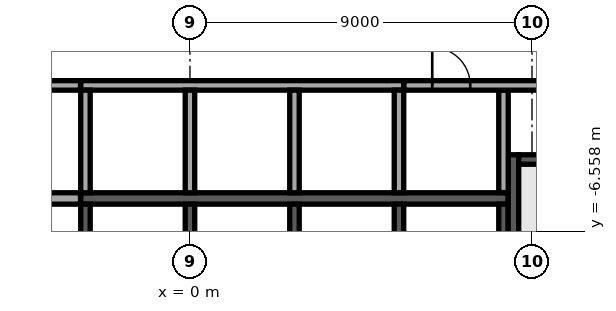
"""IFC4 building model, lengths in metres.
Left out: names, types, materials, properties, quantities, classifications, styles, units other than length and angle.
Written with IfcOpenShell. Run it as: python <this file> out.ifc"""

import sys

from ifc_helpers import new_model, si_unit, direction, frame, frame_2d, origin, place, context, subcontext, project, spatial, rectangle, extrude, element, fill, save


model = new_model("IFC4")
c1 = context("Model", 3, precision=1e-05, world=origin(), true_north=direction((0.0, 1.0)))
c2 = subcontext(c1, "Body", "Model", "MODEL_VIEW")
j1 = project(units=[si_unit("LENGTHUNIT", "METRE"), si_unit("PLANEANGLEUNIT", "RADIAN")], contexts=[c1])
p1 = place(None, origin())
s1 = spatial("IfcSite", under=j1, at=p1, CompositionType="ELEMENT")
p2 = place(p1, origin())
s2 = spatial("IfcBuilding", under=s1, at=p2, CompositionType="ELEMENT")
p3 = place(p2, frame((0.0, 0.0, 217.3)))
s3 = spatial("IfcBuildingStorey", under=s2, at=p3, CompositionType="ELEMENT", Elevation=217.3)
p4 = place(p3, frame((-2.875, -5.7, 0.0), z_axis=(0.0, 0.0, 1.0), x_axis=(1.0, 0.0, 0.0)))
e1 = element("IfcWall", 1, at=p4, inside=s3, PredefinedType="SOLIDWALL", context=c2, shape_type="SweptSolid", body=[
    extrude(rectangle(XDim=11.25, YDim=0.3, at=frame_2d((5.625, 0.0))), origin(), (0.0, 0.0, 1.0), 3.62),
])
p5 = place(p3, frame((-2.875, -2.725, 0.0), z_axis=(0.0, 0.0, 1.0), x_axis=(1.0, 0.0, 0.0)))
e2 = element("IfcWall", 2, at=p5, inside=s3, PredefinedType="SOLIDWALL", context=c2, shape_type="SweptSolid", body=[
    extrude(rectangle(XDim=8.5, YDim=0.25, at=frame_2d((4.25, 0.0))), origin(), (0.0, 0.0, 1.0), 3.62),
])
for number, where, z_axis, x_axis in (
    (3, (-2.75, -5.55, 0.0), (0.0, 0.0, 1.0), (0.0, 1.0, 0.0)),
    (4, (0.0, -5.55, 0.0), (0.0, 0.0, 1.0), (0.0, 1.0, 0.0)),
    (5, (2.75, -5.55, 0.0), (0.0, 0.0, 1.0), (0.0, 1.0, 0.0)),
    (6, (5.5, -5.55, 0.0), (0.0, 0.0, 1.0), (0.0, 1.0, 0.0)),
    (7, (-2.75, -8.55, 0.0), (0.0, 0.0, 1.0), (0.0, 1.0, 0.0)),
    (8, (0.0, -8.55, 0.0), (0.0, 0.0, 1.0), (0.0, 1.0, 0.0)),
    (9, (2.75, -8.55, 0.0), (0.0, 0.0, 1.0), (0.0, 1.0, 0.0)),
    (10, (5.5, -8.55, 0.0), (0.0, 0.0, 1.0), (0.0, 1.0, 0.0)),
    (11, (8.25, -8.55, 0.0), (0.0, 0.0, 1.0), (0.0, 1.0, 0.0)),
):
    element("IfcWall", number, at=place(p3, frame(where, z_axis=z_axis, x_axis=x_axis)), inside=s3, PredefinedType="SOLIDWALL", context=c2, shape_type="SweptSolid", body=[
        extrude(rectangle(XDim=2.7, YDim=0.25, at=frame_2d((1.35, 0.0))), origin(), (0.0, 0.0, 1.0), 3.62),
    ])
p6 = place(p3, frame((8.512, -4.55, 0.0), z_axis=(0.0, 0.0, 1.0), x_axis=(0.0, -1.0, 0.0)))
e12 = element("IfcWall", 12, at=p6, inside=s3, PredefinedType="SOLIDWALL", context=c2, shape_type="SweptSolid", body=[
    extrude(rectangle(XDim=7.25, YDim=0.275, at=frame_2d((3.625, 0.0))), origin(), (0.0, 0.0, 1.0), 3.62),
])
p7 = place(p6, frame((6.0, 0.0, 0.0)))
e13 = element("IfcOpeningElement", 13, at=p7, cuts=e12, PredefinedType="OPENING", context=c2, shape_type="SweptSolid", body=[
    extrude(rectangle(XDim=1.0, YDim=2.1, at=frame_2d((0.5, 1.05))), frame((0.0, 0.147, 0.0), z_axis=(0.0, -1.0, 0.0), x_axis=(1.0, 0.0, 0.0)), (0.0, 0.0, 1.0), 0.295),
])
p8 = place(p3, frame((8.65, -4.675, 0.0), z_axis=(0.0, 0.0, 1.0), x_axis=(1.0, 0.0, 0.0)))
e14 = element("IfcWall", 14, at=p8, inside=s3, PredefinedType="SOLIDWALL", context=c2, shape_type="SweptSolid", body=[
    extrude(rectangle(XDim=3.15, YDim=0.25, at=frame_2d((1.575, 0.0))), origin(), (0.0, 0.0, 1.0), 3.62),
])
p9 = place(p3, frame((-8.35, -5.7, 0.0), z_axis=(0.0, 0.0, 1.0), x_axis=(1.0, 0.0, 0.0)))
e15 = element("IfcWall", 15, at=p9, inside=s3, PredefinedType="PARTITIONING", context=c2, shape_type="SweptSolid", body=[
    extrude(rectangle(XDim=5.47, YDim=0.3, at=frame_2d((2.735, 0.0))), origin(), (0.0, 0.0, 1.0), 3.62),
])
p10 = place(p3, frame((8.25, -5.545, 0.0), z_axis=(0.0, 0.0, 1.0), x_axis=(0.0, 1.0, 0.0)))
e16 = element("IfcWall", 16, at=p10, inside=s3, PredefinedType="PARTITIONING", context=c2, shape_type="SweptSolid", body=[
    extrude(rectangle(XDim=2.69, YDim=0.25, at=frame_2d((1.345, 0.0))), origin(), (0.0, 0.0, 1.0), 3.62),
])
p11 = place(p3, frame((-11.795, -2.725, 0.0), z_axis=(0.0, 0.0, 1.0), x_axis=(1.0, 0.0, 0.0)))
e17 = element("IfcWall", 17, at=p11, inside=s3, PredefinedType="PARTITIONING", context=c2, shape_type="SweptSolid", body=[
    extrude(rectangle(XDim=8.915, YDim=0.25, at=frame_2d((4.458, 0.0))), origin(), (0.0, 0.0, 1.0), 3.62),
])
p12 = place(p11, frame((1.295, 0.0, 0.0)))
e18 = element("IfcOpeningElement", 18, at=p12, cuts=e17, PredefinedType="OPENING", context=c2, shape_type="SweptSolid", body=[
    extrude(rectangle(XDim=1.0, YDim=2.1, at=frame_2d((0.5, 1.05))), frame((0.0, 0.135, 0.0), z_axis=(0.0, -1.0, 0.0), x_axis=(1.0, 0.0, 0.0)), (0.0, 0.0, 1.0), 0.27),
])
p13 = place(p11, frame((4.42, 0.0, 0.0)))
e19 = element("IfcOpeningElement", 19, at=p13, cuts=e17, PredefinedType="OPENING", context=c2, shape_type="SweptSolid", body=[
    extrude(rectangle(XDim=1.0, YDim=2.1, at=frame_2d((0.5, 1.05))), frame((0.0, 0.135, 0.0), z_axis=(0.0, -1.0, 0.0), x_axis=(1.0, 0.0, 0.0)), (0.0, 0.0, 1.0), 0.27),
])
p14 = place(p3, frame((5.63, -2.725, 0.0), z_axis=(0.0, 0.0, 1.0), x_axis=(1.0, 0.0, 0.0)))
e20 = element("IfcWall", 20, at=p14, inside=s3, PredefinedType="PARTITIONING", context=c2, shape_type="SweptSolid", body=[
    extrude(rectangle(XDim=6.165, YDim=0.25, at=frame_2d((3.083, 0.0))), origin(), (0.0, 0.0, 1.0), 3.62),
])
p15 = place(p14, frame((0.745, 0.0, 0.0)))
e21 = element("IfcOpeningElement", 21, at=p15, cuts=e20, PredefinedType="OPENING", context=c2, shape_type="SweptSolid", body=[
    extrude(rectangle(XDim=1.0, YDim=2.1, at=frame_2d((0.5, 1.05))), frame((0.0, 0.135, 0.0), z_axis=(0.0, -1.0, 0.0), x_axis=(1.0, 0.0, 0.0)), (0.0, 0.0, 1.0), 0.27),
])
p16 = place(p14, frame((3.92, 0.0, 0.0)))
e22 = element("IfcOpeningElement", 22, at=p16, cuts=e20, PredefinedType="OPENING", context=c2, shape_type="SweptSolid", body=[
    extrude(rectangle(XDim=0.9, YDim=2.1, at=frame_2d((0.45, 1.05))), frame((0.0, 0.135, 0.0), z_axis=(0.0, -1.0, 0.0), x_axis=(1.0, 0.0, 0.0)), (0.0, 0.0, 1.0), 0.27),
])
p17 = place(p3, frame((-1.962, 34.735, 0.0), z_axis=(0.0, 0.0, 1.0), x_axis=(-0.669133181838, -0.743142506497, 0.0)))
e23 = element("IfcWall", 23, at=p17, inside=s3, PredefinedType="STANDARD", context=c2, shape_type="SweptSolid", body=[
    extrude(rectangle(XDim=49.0, YDim=0.6, at=frame_2d((24.5, 0.0))), origin(), (0.0, 0.0, 1.0), 3.62),
])
p18 = place(p17, frame((1.227, 0.0, 0.9)))
e24 = element("IfcOpeningElement", 24, at=p18, cuts=e23, PredefinedType="OPENING", context=c2, shape_type="SweptSolid", body=[
    extrude(rectangle(XDim=2.0, YDim=2.1, at=frame_2d((1.0, 1.05))), frame((0.0, 0.31, 0.0), z_axis=(0.0, -1.0, 0.0), x_axis=(1.0, 0.0, 0.0)), (0.0, 0.0, 1.0), 0.62),
])
p19 = place(p17, frame((5.682, 0.0, 0.9)))
e25 = element("IfcOpeningElement", 25, at=p19, cuts=e23, PredefinedType="OPENING", context=c2, shape_type="SweptSolid", body=[
    extrude(rectangle(XDim=2.0, YDim=2.1, at=frame_2d((1.0, 1.05))), frame((0.0, 0.31, 0.0), z_axis=(0.0, -1.0, 0.0), x_axis=(1.0, 0.0, 0.0)), (0.0, 0.0, 1.0), 0.62),
])
p20 = place(p17, frame((10.136, 0.0, 0.9)))
e26 = element("IfcOpeningElement", 26, at=p20, cuts=e23, PredefinedType="OPENING", context=c2, shape_type="SweptSolid", body=[
    extrude(rectangle(XDim=2.0, YDim=2.1, at=frame_2d((1.0, 1.05))), frame((0.0, 0.31, 0.0), z_axis=(0.0, -1.0, 0.0), x_axis=(1.0, 0.0, 0.0)), (0.0, 0.0, 1.0), 0.62),
])
p21 = place(p17, frame((14.591, 0.0, 0.9)))
e27 = element("IfcOpeningElement", 27, at=p21, cuts=e23, PredefinedType="OPENING", context=c2, shape_type="SweptSolid", body=[
    extrude(rectangle(XDim=2.0, YDim=2.1, at=frame_2d((1.0, 1.05))), frame((0.0, 0.31, 0.0), z_axis=(0.0, -1.0, 0.0), x_axis=(1.0, 0.0, 0.0)), (0.0, 0.0, 1.0), 0.62),
])
p22 = place(p17, frame((19.045, 0.0, 0.9)))
e28 = element("IfcOpeningElement", 28, at=p22, cuts=e23, PredefinedType="OPENING", context=c2, shape_type="SweptSolid", body=[
    extrude(rectangle(XDim=2.0, YDim=2.1, at=frame_2d((1.0, 1.05))), frame((0.0, 0.31, 0.0), z_axis=(0.0, -1.0, 0.0), x_axis=(1.0, 0.0, 0.0)), (0.0, 0.0, 1.0), 0.62),
])
p23 = place(p17, frame((23.5, 0.0, 0.9)))
e29 = element("IfcOpeningElement", 29, at=p23, cuts=e23, PredefinedType="OPENING", context=c2, shape_type="SweptSolid", body=[
    extrude(rectangle(XDim=2.0, YDim=2.1, at=frame_2d((1.0, 1.05))), frame((0.0, 0.31, 0.0), z_axis=(0.0, -1.0, 0.0), x_axis=(1.0, 0.0, 0.0)), (0.0, 0.0, 1.0), 0.62),
])
p24 = place(p17, frame((27.955, 0.0, 0.9)))
e30 = element("IfcOpeningElement", 30, at=p24, cuts=e23, PredefinedType="OPENING", context=c2, shape_type="SweptSolid", body=[
    extrude(rectangle(XDim=2.0, YDim=2.1, at=frame_2d((1.0, 1.05))), frame((0.0, 0.31, 0.0), z_axis=(0.0, -1.0, 0.0), x_axis=(1.0, 0.0, 0.0)), (0.0, 0.0, 1.0), 0.62),
])
p25 = place(p17, frame((32.409, 0.0, 0.9)))
e31 = element("IfcOpeningElement", 31, at=p25, cuts=e23, PredefinedType="OPENING", context=c2, shape_type="SweptSolid", body=[
    extrude(rectangle(XDim=2.0, YDim=2.1, at=frame_2d((1.0, 1.05))), frame((0.0, 0.31, 0.0), z_axis=(0.0, -1.0, 0.0), x_axis=(1.0, 0.0, 0.0)), (0.0, 0.0, 1.0), 0.62),
])
p26 = place(p17, frame((36.864, 0.0, 0.9)))
e32 = element("IfcOpeningElement", 32, at=p26, cuts=e23, PredefinedType="OPENING", context=c2, shape_type="SweptSolid", body=[
    extrude(rectangle(XDim=2.0, YDim=2.1, at=frame_2d((1.0, 1.05))), frame((0.0, 0.31, 0.0), z_axis=(0.0, -1.0, 0.0), x_axis=(1.0, 0.0, 0.0)), (0.0, 0.0, 1.0), 0.62),
])
p27 = place(p17, frame((41.318, 0.0, 0.9)))
e33 = element("IfcOpeningElement", 33, at=p27, cuts=e23, PredefinedType="OPENING", context=c2, shape_type="SweptSolid", body=[
    extrude(rectangle(XDim=2.0, YDim=2.1, at=frame_2d((1.0, 1.05))), frame((0.0, 0.31, 0.0), z_axis=(0.0, -1.0, 0.0), x_axis=(1.0, 0.0, 0.0)), (0.0, 0.0, 1.0), 0.62),
])
p28 = place(p17, frame((45.773, 0.0, 0.9)))
e34 = element("IfcOpeningElement", 34, at=p28, cuts=e23, PredefinedType="OPENING", context=c2, shape_type="SweptSolid", body=[
    extrude(rectangle(XDim=2.0, YDim=2.1, at=frame_2d((1.0, 1.05))), frame((0.0, 0.31, 0.0), z_axis=(0.0, -1.0, 0.0), x_axis=(1.0, 0.0, 0.0)), (0.0, 0.0, 1.0), 0.62),
])
p29 = place(p3, frame((1.962, -34.735, 0.0), z_axis=(0.0, 0.0, 1.0), x_axis=(0.669133181838, 0.743142506497, 0.0)))
e35 = element("IfcWall", 35, at=p29, inside=s3, PredefinedType="STANDARD", context=c2, shape_type="SweptSolid", body=[
    extrude(rectangle(XDim=49.0, YDim=0.6, at=frame_2d((24.5, 0.0))), origin(), (0.0, 0.0, 1.0), 3.62),
])
p30 = place(p29, frame((1.227, 0.0, 0.9)))
e36 = element("IfcOpeningElement", 36, at=p30, cuts=e35, PredefinedType="OPENING", context=c2, shape_type="SweptSolid", body=[
    extrude(rectangle(XDim=2.0, YDim=2.1, at=frame_2d((1.0, 1.05))), frame((0.0, 0.31, 0.0), z_axis=(0.0, -1.0, 0.0), x_axis=(1.0, 0.0, 0.0)), (0.0, 0.0, 1.0), 0.62),
])
p31 = place(p29, frame((5.682, 0.0, 0.9)))
e37 = element("IfcOpeningElement", 37, at=p31, cuts=e35, PredefinedType="OPENING", context=c2, shape_type="SweptSolid", body=[
    extrude(rectangle(XDim=2.0, YDim=2.1, at=frame_2d((1.0, 1.05))), frame((0.0, 0.31, 0.0), z_axis=(0.0, -1.0, 0.0), x_axis=(1.0, 0.0, 0.0)), (0.0, 0.0, 1.0), 0.62),
])
p32 = place(p29, frame((10.136, 0.0, 0.9)))
e38 = element("IfcOpeningElement", 38, at=p32, cuts=e35, PredefinedType="OPENING", context=c2, shape_type="SweptSolid", body=[
    extrude(rectangle(XDim=2.0, YDim=2.1, at=frame_2d((1.0, 1.05))), frame((0.0, 0.31, 0.0), z_axis=(0.0, -1.0, 0.0), x_axis=(1.0, 0.0, 0.0)), (0.0, 0.0, 1.0), 0.62),
])
p33 = place(p29, frame((14.591, 0.0, 0.9)))
e39 = element("IfcOpeningElement", 39, at=p33, cuts=e35, PredefinedType="OPENING", context=c2, shape_type="SweptSolid", body=[
    extrude(rectangle(XDim=2.0, YDim=2.1, at=frame_2d((1.0, 1.05))), frame((0.0, 0.31, 0.0), z_axis=(0.0, -1.0, 0.0), x_axis=(1.0, 0.0, 0.0)), (0.0, 0.0, 1.0), 0.62),
])
p34 = place(p29, frame((19.045, 0.0, 0.9)))
e40 = element("IfcOpeningElement", 40, at=p34, cuts=e35, PredefinedType="OPENING", context=c2, shape_type="SweptSolid", body=[
    extrude(rectangle(XDim=2.0, YDim=2.1, at=frame_2d((1.0, 1.05))), frame((0.0, 0.31, 0.0), z_axis=(0.0, -1.0, 0.0), x_axis=(1.0, 0.0, 0.0)), (0.0, 0.0, 1.0), 0.62),
])
p35 = place(p29, frame((23.5, 0.0, 0.9)))
e41 = element("IfcOpeningElement", 41, at=p35, cuts=e35, PredefinedType="OPENING", context=c2, shape_type="SweptSolid", body=[
    extrude(rectangle(XDim=2.0, YDim=2.1, at=frame_2d((1.0, 1.05))), frame((0.0, 0.31, 0.0), z_axis=(0.0, -1.0, 0.0), x_axis=(1.0, 0.0, 0.0)), (0.0, 0.0, 1.0), 0.62),
])
p36 = place(p29, frame((27.955, 0.0, 0.9)))
e42 = element("IfcOpeningElement", 42, at=p36, cuts=e35, PredefinedType="OPENING", context=c2, shape_type="SweptSolid", body=[
    extrude(rectangle(XDim=2.0, YDim=2.1, at=frame_2d((1.0, 1.05))), frame((0.0, 0.31, 0.0), z_axis=(0.0, -1.0, 0.0), x_axis=(1.0, 0.0, 0.0)), (0.0, 0.0, 1.0), 0.62),
])
p37 = place(p29, frame((32.409, 0.0, 0.9)))
e43 = element("IfcOpeningElement", 43, at=p37, cuts=e35, PredefinedType="OPENING", context=c2, shape_type="SweptSolid", body=[
    extrude(rectangle(XDim=2.0, YDim=2.1, at=frame_2d((1.0, 1.05))), frame((0.0, 0.31, 0.0), z_axis=(0.0, -1.0, 0.0), x_axis=(1.0, 0.0, 0.0)), (0.0, 0.0, 1.0), 0.62),
])
p38 = place(p29, frame((36.864, 0.0, 0.9)))
e44 = element("IfcOpeningElement", 44, at=p38, cuts=e35, PredefinedType="OPENING", context=c2, shape_type="SweptSolid", body=[
    extrude(rectangle(XDim=2.0, YDim=2.1, at=frame_2d((1.0, 1.05))), frame((0.0, 0.31, 0.0), z_axis=(0.0, -1.0, 0.0), x_axis=(1.0, 0.0, 0.0)), (0.0, 0.0, 1.0), 0.62),
])
p39 = place(p29, frame((41.318, 0.0, 0.9)))
e45 = element("IfcOpeningElement", 45, at=p39, cuts=e35, PredefinedType="OPENING", context=c2, shape_type="SweptSolid", body=[
    extrude(rectangle(XDim=2.0, YDim=2.1, at=frame_2d((1.0, 1.05))), frame((0.0, 0.31, 0.0), z_axis=(0.0, -1.0, 0.0), x_axis=(1.0, 0.0, 0.0)), (0.0, 0.0, 1.0), 0.62),
])
p40 = place(p29, frame((45.773, 0.0, 0.9)))
e46 = element("IfcOpeningElement", 46, at=p40, cuts=e35, PredefinedType="OPENING", context=c2, shape_type="SweptSolid", body=[
    extrude(rectangle(XDim=2.0, YDim=2.1, at=frame_2d((1.0, 1.05))), frame((0.0, 0.31, 0.0), z_axis=(0.0, -1.0, 0.0), x_axis=(1.0, 0.0, 0.0)), (0.0, 0.0, 1.0), 0.62),
])
p41 = place(p3, frame((3.676, -24.653, 0.0), z_axis=(0.0, 0.0, 1.0), x_axis=(0.669124220942, 0.743150574882, 0.0)))
e47 = element("IfcWall", 47, at=p41, inside=s3, PredefinedType="PARTITIONING", context=c2, shape_type="SweptSolid", body=[
    extrude(rectangle(XDim=31.796, YDim=0.15, at=frame_2d((15.898, 0.0))), origin(), (0.0, 0.0, 1.0), 3.17),
])
p42 = place(p41, frame((9.41, 0.0, 0.0)))
e48 = element("IfcOpeningElement", 48, at=p42, cuts=e47, PredefinedType="OPENING", context=c2, shape_type="SweptSolid", body=[
    extrude(rectangle(XDim=1.0, YDim=2.1, at=frame_2d((0.5, 1.05))), frame((0.0, 0.085, 0.0), z_axis=(0.0, -1.0, 0.0), x_axis=(1.0, 0.0, 0.0)), (0.0, 0.0, 1.0), 0.17),
])
p43 = place(p41, frame((23.981, 0.0, 0.0)))
e49 = element("IfcOpeningElement", 49, at=p43, cuts=e47, PredefinedType="OPENING", context=c2, shape_type="SweptSolid", body=[
    extrude(rectangle(XDim=1.0, YDim=2.1, at=frame_2d((0.5, 1.05))), frame((0.0, 0.085, 0.0), z_axis=(0.0, -1.0, 0.0), x_axis=(1.0, 0.0, 0.0)), (0.0, 0.0, 1.0), 0.17),
])
p44 = place(p15, origin())
e50 = element("IfcDoor", 50, at=p44, inside=s3, OperationType="SINGLE_SWING_RIGHT", PredefinedType="DOOR", context=c2, shape_type="SweptSolid", body=[
    extrude(rectangle(XDim=1.0, YDim=2.1, at=frame_2d((0.5, 1.05))), frame((0.0, 0.025, 0.0), z_axis=(0.0, -1.0, 0.0), x_axis=(1.0, 0.0, 0.0)), (0.0, 0.0, 1.0), 0.05),
])
fill(e21, e50)
save(model, sys.argv[1])
